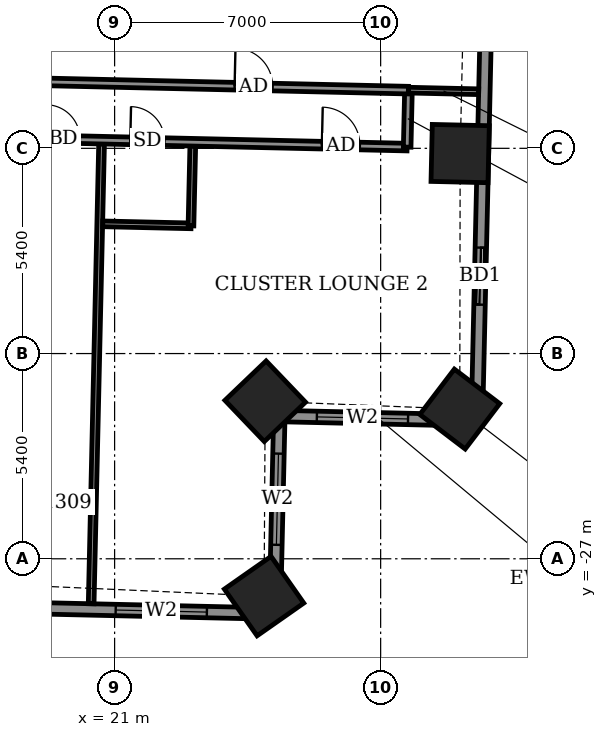
"""IFC4 building model, lengths in metres.
Left out: names, types, materials, properties, quantities, classifications, styles, units other than length and angle.
Written with IfcOpenShell. Run it as: python <this file> out.ifc"""

import sys

from ifc_helpers import new_model, si_unit, direction, frame, frame_2d, origin, origin_2d, place, context, subcontext, project, spatial, rectangle, extrude, element, fill, save


model = new_model("IFC4")
c1 = context("Model", 3, precision=1e-05, world=origin(), true_north=direction((0.0, 1.0)))
c2 = subcontext(c1, "Body", "Model", "MODEL_VIEW")
j1 = project(units=[si_unit("LENGTHUNIT", "METRE"), si_unit("PLANEANGLEUNIT", "RADIAN")], contexts=[c1])
p1 = place(None, origin())
s1 = spatial("IfcSite", under=j1, at=p1, CompositionType="ELEMENT")
p2 = place(p1, origin())
s2 = spatial("IfcBuilding", under=s1, at=p2, CompositionType="ELEMENT")
p3 = place(p2, frame((0.0, 0.0, 56.7)))
s3 = spatial("IfcBuildingStorey", under=s2, at=p3, CompositionType="ELEMENT", Elevation=56.7)
for number, where, z_axis, x_axis in (
    (1, (24.933, -27.982, -0.55), (0.0, 0.0, 1.0), (0.819, 0.574, 0.0)),
    (2, (24.963, -22.855, -0.55), (0.0, 0.0, 1.0), (0.723, 0.691, 0.0)),
    (3, (30.082, -23.061, -0.55), (0.0, 0.0, 1.0), (0.606, 0.796, 0.0)),
    (4, (30.092, -16.338, -0.55), (0.0, 0.0, 1.0), (0.023, 1.0, 0.0)),
):
    element("IfcColumn", number, at=place(p3, frame(where, z_axis=z_axis, x_axis=x_axis)), inside=s3, PredefinedType="COLUMN", context=c2, shape_type="SweptSolid", body=[
        extrude(rectangle(XDim=1.5, YDim=1.5, at=origin_2d()), origin(), (0.0, 0.0, 1.0), 3.6),
    ])
p4 = place(p3, frame((30.533, -23.362, 0.0), z_axis=(0.0, 0.0, 1.0), x_axis=(0.022698800888, 0.999742349027, 0.0)))
e5 = element("IfcWall", 5, at=p4, inside=s3, PredefinedType="SOLIDWALL", context=c2, shape_type="SweptSolid", body=[
    extrude(rectangle(XDim=14.23, YDim=0.3, at=frame_2d((7.115, 0.0))), origin(), (0.0, 0.0, 1.0), 3.05),
])
p5 = place(p4, frame((3.05, 0.0, 0.0)))
e6 = element("IfcOpeningElement", 6, at=p5, cuts=e5, PredefinedType="OPENING", context=c2, shape_type="SweptSolid", body=[
    extrude(rectangle(XDim=1.5, YDim=2.4, at=frame_2d((0.75, 1.2))), frame((0.0, 0.16, 0.0), z_axis=(0.0, -1.0, 0.0), x_axis=(1.0, 0.0, 0.0)), (0.0, 0.0, 1.0), 0.32),
])
p6 = place(p4, frame((9.937, 0.0, 0.9)))
e7 = element("IfcOpeningElement", 7, at=p6, cuts=e5, PredefinedType="OPENING", context=c2, shape_type="SweptSolid", body=[
    extrude(rectangle(XDim=2.4, YDim=1.5, at=frame_2d((1.2, 0.75))), frame((0.0, 0.16, 0.0), z_axis=(0.0, -1.0, 0.0), x_axis=(1.0, 0.0, 0.0)), (0.0, 0.0, 1.0), 0.32),
])
p7 = place(p3, frame((-24.007, -27.326, 0.0), z_axis=(0.0, 0.0, 1.0), x_axis=(0.999742536491, -0.022690542744, 0.0)))
e8 = element("IfcWall", 8, at=p7, inside=s3, PredefinedType="SOLIDWALL", context=c2, shape_type="SweptSolid", body=[
    extrude(rectangle(XDim=49.236, YDim=0.3, at=frame_2d((24.618, 0.0))), origin(), (0.0, 0.0, 1.0), 3.05),
])
p8 = place(p7, frame((2.115, 0.0, 0.0)))
e9 = element("IfcOpeningElement", 9, at=p8, cuts=e8, PredefinedType="OPENING", context=c2, shape_type="SweptSolid", body=[
    extrude(rectangle(XDim=1.5, YDim=2.4, at=frame_2d((0.75, 1.2))), frame((0.0, 0.16, 0.0), z_axis=(0.0, -1.0, 0.0), x_axis=(1.0, 0.0, 0.0)), (0.0, 0.0, 1.0), 0.32),
])
p9 = place(p7, frame((5.088, 0.0, 0.9)))
e10 = element("IfcOpeningElement", 10, at=p9, cuts=e8, PredefinedType="OPENING", context=c2, shape_type="SweptSolid", body=[
    extrude(rectangle(XDim=0.9, YDim=1.5, at=frame_2d((0.45, 0.75))), frame((0.0, 0.16, 0.0), z_axis=(0.0, -1.0, 0.0), x_axis=(1.0, 0.0, 0.0)), (0.0, 0.0, 1.0), 0.32),
])
p10 = place(p7, frame((10.475, 0.0, 0.0)))
e11 = element("IfcOpeningElement", 11, at=p10, cuts=e8, PredefinedType="OPENING", context=c2, shape_type="SweptSolid", body=[
    extrude(rectangle(XDim=1.5, YDim=2.4, at=frame_2d((0.75, 1.2))), frame((0.0, 0.16, 0.0), z_axis=(0.0, -1.0, 0.0), x_axis=(1.0, 0.0, 0.0)), (0.0, 0.0, 1.0), 0.32),
])
p11 = place(p7, frame((15.477, 0.0, 0.0)))
e12 = element("IfcOpeningElement", 12, at=p11, cuts=e8, PredefinedType="OPENING", context=c2, shape_type="SweptSolid", body=[
    extrude(rectangle(XDim=1.5, YDim=2.4, at=frame_2d((0.75, 1.2))), frame((0.0, 0.16, 0.0), z_axis=(0.0, -1.0, 0.0), x_axis=(1.0, 0.0, 0.0)), (0.0, 0.0, 1.0), 0.32),
])
p12 = place(p7, frame((18.515, 0.0, 0.0)))
e13 = element("IfcOpeningElement", 13, at=p12, cuts=e8, PredefinedType="OPENING", context=c2, shape_type="SweptSolid", body=[
    extrude(rectangle(XDim=1.5, YDim=2.4, at=frame_2d((0.75, 1.2))), frame((0.0, 0.16, 0.0), z_axis=(0.0, -1.0, 0.0), x_axis=(1.0, 0.0, 0.0)), (0.0, 0.0, 1.0), 0.32),
])
p13 = place(p7, frame((23.825, 0.0, 0.0)))
e14 = element("IfcOpeningElement", 14, at=p13, cuts=e8, PredefinedType="OPENING", context=c2, shape_type="SweptSolid", body=[
    extrude(rectangle(XDim=1.5, YDim=2.4, at=frame_2d((0.75, 1.2))), frame((0.0, 0.16, 0.0), z_axis=(0.0, -1.0, 0.0), x_axis=(1.0, 0.0, 0.0)), (0.0, 0.0, 1.0), 0.32),
])
p14 = place(p7, frame((29.128, 0.0, 0.0)))
e15 = element("IfcOpeningElement", 15, at=p14, cuts=e8, PredefinedType="OPENING", context=c2, shape_type="SweptSolid", body=[
    extrude(rectangle(XDim=1.5, YDim=2.4, at=frame_2d((0.75, 1.2))), frame((0.0, 0.16, 0.0), z_axis=(0.0, -1.0, 0.0), x_axis=(1.0, 0.0, 0.0)), (0.0, 0.0, 1.0), 0.32),
])
p15 = place(p7, frame((32.166, 0.0, 0.0)))
e16 = element("IfcOpeningElement", 16, at=p15, cuts=e8, PredefinedType="OPENING", context=c2, shape_type="SweptSolid", body=[
    extrude(rectangle(XDim=1.5, YDim=2.4, at=frame_2d((0.75, 1.2))), frame((0.0, 0.16, 0.0), z_axis=(0.0, -1.0, 0.0), x_axis=(1.0, 0.0, 0.0)), (0.0, 0.0, 1.0), 0.32),
])
p16 = place(p7, frame((37.091, 0.0, 0.0)))
e17 = element("IfcOpeningElement", 17, at=p16, cuts=e8, PredefinedType="OPENING", context=c2, shape_type="SweptSolid", body=[
    extrude(rectangle(XDim=1.5, YDim=2.4, at=frame_2d((0.75, 1.2))), frame((0.0, 0.16, 0.0), z_axis=(0.0, -1.0, 0.0), x_axis=(1.0, 0.0, 0.0)), (0.0, 0.0, 1.0), 0.32),
])
p17 = place(p7, frame((40.205, 0.0, 0.0)))
e18 = element("IfcOpeningElement", 18, at=p17, cuts=e8, PredefinedType="OPENING", context=c2, shape_type="SweptSolid", body=[
    extrude(rectangle(XDim=1.2, YDim=2.4, at=frame_2d((0.6, 1.2))), frame((0.0, 0.16, 0.0), z_axis=(0.0, -1.0, 0.0), x_axis=(1.0, 0.0, 0.0)), (0.0, 0.0, 1.0), 0.32),
])
p18 = place(p7, frame((45.047, 0.0, 0.9)))
e19 = element("IfcOpeningElement", 19, at=p18, cuts=e8, PredefinedType="OPENING", context=c2, shape_type="SweptSolid", body=[
    extrude(rectangle(XDim=2.4, YDim=1.5, at=frame_2d((1.2, 0.75))), frame((0.0, 0.16, 0.0), z_axis=(0.0, -1.0, 0.0), x_axis=(1.0, 0.0, 0.0)), (0.0, 0.0, 1.0), 0.32),
])
p19 = place(p3, frame((25.216, -28.443, 0.0), z_axis=(0.0, 0.0, 1.0), x_axis=(0.022674484462, 0.999742900827, 0.0)))
e20 = element("IfcWall", 20, at=p19, inside=s3, PredefinedType="SOLIDWALL", context=c2, shape_type="SweptSolid", body=[
    extrude(rectangle(XDim=5.2, YDim=0.3, at=frame_2d((2.6, 0.0))), origin(), (0.0, 0.0, 1.0), 2.55),
])
p20 = place(p19, frame((1.811, 0.0, 0.9)))
e21 = element("IfcOpeningElement", 21, at=p20, cuts=e20, PredefinedType="OPENING", context=c2, shape_type="SweptSolid", body=[
    extrude(rectangle(XDim=2.4, YDim=1.5, at=frame_2d((1.2, 0.75))), frame((0.0, 0.16, 0.0), z_axis=(0.0, -1.0, 0.0), x_axis=(1.0, 0.0, 0.0)), (0.0, 0.0, 1.0), 0.32),
])
p21 = place(p3, frame((25.334, -23.244, 0.0), z_axis=(0.0, 0.0, 1.0), x_axis=(0.999741811307, -0.022722471786, 0.0)))
e22 = element("IfcWall", 22, at=p21, inside=s3, PredefinedType="SOLIDWALL", context=c2, shape_type="SweptSolid", body=[
    extrude(rectangle(XDim=5.2, YDim=0.3, at=frame_2d((2.6, 0.0))), origin(), (0.0, 0.0, 1.0), 2.55),
])
p22 = place(p21, frame((0.988, 0.0, 0.9)))
e23 = element("IfcOpeningElement", 23, at=p22, cuts=e22, PredefinedType="OPENING", context=c2, shape_type="SweptSolid", body=[
    extrude(rectangle(XDim=2.4, YDim=1.5, at=frame_2d((1.2, 0.75))), frame((0.0, 0.16, 0.0), z_axis=(0.0, -1.0, 0.0), x_axis=(1.0, 0.0, 0.0)), (0.0, 0.0, 1.0), 0.32),
])
p23 = place(p3, frame((20.383, -28.183, 0.0), z_axis=(0.0, 0.0, 1.0), x_axis=(0.022637991173, 0.99974372784, 0.0)))
e24 = element("IfcWall", 24, at=p23, inside=s3, PredefinedType="PARTITIONING", context=c2, shape_type="SweptSolid", body=[
    extrude(rectangle(XDim=12.1, YDim=0.15, at=frame_2d((6.05, 0.0))), origin(), (0.0, 0.0, 1.0), 2.55),
])
p24 = place(p3, frame((20.687, -18.187, 0.0), z_axis=(0.0, 0.0, 1.0), x_axis=(0.999740260747, -0.02279059109, 0.0)))
e25 = element("IfcWall", 25, at=p24, inside=s3, PredefinedType="PARTITIONING", context=c2, shape_type="SweptSolid", body=[
    extrude(rectangle(XDim=2.324, YDim=0.15, at=frame_2d((1.162, 0.0))), origin(), (0.0, 0.0, 1.0), 3.05),
])
p25 = place(p3, frame((23.009, -18.24, 0.0), z_axis=(0.0, 0.0, 1.0), x_axis=(0.022792727877, 0.999740212033, 0.0)))
e26 = element("IfcWall", 26, at=p25, inside=s3, PredefinedType="PARTITIONING", context=c2, shape_type="SweptSolid", body=[
    extrude(rectangle(XDim=2.099, YDim=0.15, at=frame_2d((1.05, 0.0))), origin(), (0.0, 0.0, 1.0), 3.05),
])
p26 = place(p3, frame((-26.126, -14.924, 0.0), z_axis=(0.0, 0.0, 1.0), x_axis=(0.999742687583, -0.0226838847, 0.0)))
e27 = element("IfcWall", 27, at=p26, inside=s3, PredefinedType="PARTITIONING", context=c2, shape_type="SweptSolid", body=[
    extrude(rectangle(XDim=54.836, YDim=0.2, at=frame_2d((27.418, 0.0))), origin(), (0.0, 0.0, 1.0), 3.05),
])
p27 = place(p26, frame((0.775, 0.0, 0.0)))
e28 = element("IfcOpeningElement", 28, at=p27, cuts=e27, PredefinedType="OPENING", context=c2, shape_type="SweptSolid", body=[
    extrude(rectangle(XDim=1.0, YDim=2.1, at=frame_2d((0.5, 1.05))), frame((0.0, 0.11, 0.0), z_axis=(0.0, -1.0, 0.0), x_axis=(1.0, 0.0, 0.0)), (0.0, 0.0, 1.0), 0.22),
])
p28 = place(p26, frame((5.45, 0.0, 0.0)))
e29 = element("IfcOpeningElement", 29, at=p28, cuts=e27, PredefinedType="OPENING", context=c2, shape_type="SweptSolid", body=[
    extrude(rectangle(XDim=0.9, YDim=2.1, at=frame_2d((0.45, 1.05))), frame((0.0, 0.11, 0.0), z_axis=(0.0, -1.0, 0.0), x_axis=(1.0, 0.0, 0.0)), (0.0, 0.0, 1.0), 0.22),
])
p29 = place(p26, frame((10.0, 0.0, 0.0)))
e30 = element("IfcOpeningElement", 30, at=p29, cuts=e27, PredefinedType="OPENING", context=c2, shape_type="SweptSolid", body=[
    extrude(rectangle(XDim=0.9, YDim=2.1, at=frame_2d((0.45, 1.05))), frame((0.0, 0.11, 0.0), z_axis=(0.0, -1.0, 0.0), x_axis=(1.0, 0.0, 0.0)), (0.0, 0.0, 1.0), 0.22),
])
p30 = place(p26, frame((11.975, 0.0, 0.0)))
e31 = element("IfcOpeningElement", 31, at=p30, cuts=e27, PredefinedType="OPENING", context=c2, shape_type="SweptSolid", body=[
    extrude(rectangle(XDim=0.9, YDim=2.1, at=frame_2d((0.45, 1.05))), frame((0.0, 0.11, 0.0), z_axis=(0.0, -1.0, 0.0), x_axis=(1.0, 0.0, 0.0)), (0.0, 0.0, 1.0), 0.22),
])
p31 = place(p26, frame((18.85, 0.0, 0.0)))
e32 = element("IfcOpeningElement", 32, at=p31, cuts=e27, PredefinedType="OPENING", context=c2, shape_type="SweptSolid", body=[
    extrude(rectangle(XDim=0.9, YDim=2.1, at=frame_2d((0.45, 1.05))), frame((0.0, 0.11, 0.0), z_axis=(0.0, -1.0, 0.0), x_axis=(1.0, 0.0, 0.0)), (0.0, 0.0, 1.0), 0.22),
])
p32 = place(p26, frame((20.9, 0.0, 0.0)))
e33 = element("IfcOpeningElement", 33, at=p32, cuts=e27, PredefinedType="OPENING", context=c2, shape_type="SweptSolid", body=[
    extrude(rectangle(XDim=0.9, YDim=2.1, at=frame_2d((0.45, 1.05))), frame((0.0, 0.11, 0.0), z_axis=(0.0, -1.0, 0.0), x_axis=(1.0, 0.0, 0.0)), (0.0, 0.0, 1.0), 0.22),
])
p33 = place(p26, frame((27.725, 0.0, 0.0)))
e34 = element("IfcOpeningElement", 34, at=p33, cuts=e27, PredefinedType="OPENING", context=c2, shape_type="SweptSolid", body=[
    extrude(rectangle(XDim=0.9, YDim=2.1, at=frame_2d((0.45, 1.05))), frame((0.0, 0.11, 0.0), z_axis=(0.0, -1.0, 0.0), x_axis=(1.0, 0.0, 0.0)), (0.0, 0.0, 1.0), 0.22),
])
p34 = place(p26, frame((29.7, 0.0, 0.0)))
e35 = element("IfcOpeningElement", 35, at=p34, cuts=e27, PredefinedType="OPENING", context=c2, shape_type="SweptSolid", body=[
    extrude(rectangle(XDim=0.9, YDim=2.1, at=frame_2d((0.45, 1.05))), frame((0.0, 0.11, 0.0), z_axis=(0.0, -1.0, 0.0), x_axis=(1.0, 0.0, 0.0)), (0.0, 0.0, 1.0), 0.22),
])
p35 = place(p26, frame((36.5, 0.0, 0.0)))
e36 = element("IfcOpeningElement", 36, at=p35, cuts=e27, PredefinedType="OPENING", context=c2, shape_type="SweptSolid", body=[
    extrude(rectangle(XDim=0.9, YDim=2.1, at=frame_2d((0.45, 1.05))), frame((0.0, 0.11, 0.0), z_axis=(0.0, -1.0, 0.0), x_axis=(1.0, 0.0, 0.0)), (0.0, 0.0, 1.0), 0.22),
])
p36 = place(p26, frame((38.525, 0.0, 0.0)))
e37 = element("IfcOpeningElement", 37, at=p36, cuts=e27, PredefinedType="OPENING", context=c2, shape_type="SweptSolid", body=[
    extrude(rectangle(XDim=0.9, YDim=2.1, at=frame_2d((0.45, 1.05))), frame((0.0, 0.11, 0.0), z_axis=(0.0, -1.0, 0.0), x_axis=(1.0, 0.0, 0.0)), (0.0, 0.0, 1.0), 0.22),
])
p37 = place(p26, frame((45.325, 0.0, 0.0)))
e38 = element("IfcOpeningElement", 38, at=p37, cuts=e27, PredefinedType="OPENING", context=c2, shape_type="SweptSolid", body=[
    extrude(rectangle(XDim=0.9, YDim=2.1, at=frame_2d((0.45, 1.05))), frame((0.0, 0.11, 0.0), z_axis=(0.0, -1.0, 0.0), x_axis=(1.0, 0.0, 0.0)), (0.0, 0.0, 1.0), 0.22),
])
p38 = place(p26, frame((52.593, 0.0, 0.0)))
e39 = element("IfcOpeningElement", 39, at=p38, cuts=e27, PredefinedType="OPENING", context=c2, shape_type="SweptSolid", body=[
    extrude(rectangle(XDim=1.0, YDim=2.1, at=frame_2d((0.5, 1.05))), frame((0.0, 0.11, 0.0), z_axis=(0.0, -1.0, 0.0), x_axis=(1.0, 0.0, 0.0)), (0.0, 0.0, 1.0), 0.22),
])
p39 = place(p26, frame((47.55, 0.0, 0.0)))
e40 = element("IfcOpeningElement", 40, at=p39, cuts=e27, PredefinedType="OPENING", context=c2, shape_type="SweptSolid", body=[
    extrude(rectangle(XDim=0.9, YDim=2.1, at=frame_2d((0.45, 1.05))), frame((0.0, 0.11, 0.0), z_axis=(0.0, -1.0, 0.0), x_axis=(1.0, 0.0, 0.0)), (0.0, 0.0, 1.0), 0.22),
])
p40 = place(p3, frame((28.698, -16.169, 0.0), z_axis=(0.0, 0.0, 1.0), x_axis=(0.022617910375, 0.999744182344, 0.0)))
e41 = element("IfcWall", 41, at=p40, inside=s3, PredefinedType="PARTITIONING", context=c2, shape_type="SweptSolid", body=[
    extrude(rectangle(XDim=1.5, YDim=0.2, at=frame_2d((0.75, 0.0))), origin(), (0.0, 0.0, 1.0), 3.05),
])
p41 = place(p3, frame((18.382, -14.434, 0.0), z_axis=(0.0, 0.0, 1.0), x_axis=(0.999742529177, -0.022690865001, 0.0)))
e42 = element("IfcWall", 42, at=p41, inside=s3, PredefinedType="PARTITIONING", context=c2, shape_type="SweptSolid", body=[
    extrude(rectangle(XDim=10.351, YDim=0.2, at=frame_2d((5.175, 0.0))), origin(), (0.0, 0.0, 1.0), 3.05),
])
p42 = place(p41, frame((5.777, 0.0, 0.0)))
e43 = element("IfcOpeningElement", 43, at=p42, cuts=e42, PredefinedType="OPENING", context=c2, shape_type="SweptSolid", body=[
    extrude(rectangle(XDim=1.0, YDim=2.1, at=frame_2d((0.5, 1.05))), frame((0.0, 0.11, 0.0), z_axis=(0.0, -1.0, 0.0), x_axis=(1.0, 0.0, 0.0)), (0.0, 0.0, 1.0), 0.22),
])
p43 = place(p3, frame((28.73, -14.669, 0.0), z_axis=(0.0, 0.0, 1.0), x_axis=(0.999742244252, -0.022703415106, 0.0)))
e44 = element("IfcWall", 44, at=p43, inside=s3, PredefinedType="PARTITIONING", context=c2, shape_type="SweptSolid", body=[
    extrude(rectangle(XDim=1.85, YDim=0.15, at=frame_2d((0.925, 0.0))), origin(), (0.0, 0.0, 1.0), 2.55),
])
p44 = place(p5, origin())
e45 = element("IfcDoor", 45, at=p44, inside=s3, OperationType="SLIDING_TO_LEFT", PredefinedType="DOOR", context=c2, shape_type="SweptSolid", body=[
    extrude(rectangle(XDim=1.5, YDim=2.4, at=frame_2d((0.75, 1.2))), frame((0.0, 0.025, 0.0), z_axis=(0.0, -1.0, 0.0), x_axis=(1.0, 0.0, 0.0)), (0.0, 0.0, 1.0), 0.05),
])
fill(e6, e45)
p45 = place(p18, origin())
e46 = element("IfcWindow", 46, at=p45, inside=s3, PartitioningType="DOUBLE_PANEL_VERTICAL", PredefinedType="WINDOW", context=c2, shape_type="SweptSolid", body=[
    extrude(rectangle(XDim=2.4, YDim=1.5, at=frame_2d((1.2, 0.75))), frame((0.0, 0.03, 0.0), z_axis=(0.0, -1.0, 0.0), x_axis=(1.0, 0.0, 0.0)), (0.0, 0.0, 1.0), 0.06),
])
fill(e19, e46)
p46 = place(p20, origin())
e47 = element("IfcWindow", 47, at=p46, inside=s3, PartitioningType="DOUBLE_PANEL_VERTICAL", PredefinedType="WINDOW", context=c2, shape_type="SweptSolid", body=[
    extrude(rectangle(XDim=2.4, YDim=1.5, at=frame_2d((1.2, 0.75))), frame((0.0, 0.03, 0.0), z_axis=(0.0, -1.0, 0.0), x_axis=(1.0, 0.0, 0.0)), (0.0, 0.0, 1.0), 0.06),
])
fill(e21, e47)
p47 = place(p22, origin())
e48 = element("IfcWindow", 48, at=p47, inside=s3, PartitioningType="DOUBLE_PANEL_VERTICAL", PredefinedType="WINDOW", context=c2, shape_type="SweptSolid", body=[
    extrude(rectangle(XDim=2.4, YDim=1.5, at=frame_2d((1.2, 0.75))), frame((0.0, 0.03, 0.0), z_axis=(0.0, -1.0, 0.0), x_axis=(1.0, 0.0, 0.0)), (0.0, 0.0, 1.0), 0.06),
])
fill(e23, e48)
p48 = place(p37, origin())
e49 = element("IfcDoor", 49, at=p48, inside=s3, OperationType="SINGLE_SWING_LEFT", PredefinedType="DOOR", context=c2, shape_type="SweptSolid", body=[
    extrude(rectangle(XDim=0.9, YDim=2.1, at=frame_2d((0.45, 1.05))), frame((0.0, 0.025, 0.0), z_axis=(0.0, -1.0, 0.0), x_axis=(1.0, 0.0, 0.0)), (0.0, 0.0, 1.0), 0.05),
])
fill(e38, e49)
p49 = place(p38, origin())
e50 = element("IfcDoor", 50, at=p49, inside=s3, OperationType="SINGLE_SWING_RIGHT", PredefinedType="DOOR", context=c2, shape_type="SweptSolid", body=[
    extrude(rectangle(XDim=1.0, YDim=2.1, at=frame_2d((0.5, 1.05))), frame((0.0, 0.025, 0.0), z_axis=(0.0, -1.0, 0.0), x_axis=(1.0, 0.0, 0.0)), (0.0, 0.0, 1.0), 0.05),
])
fill(e39, e50)
p50 = place(p39, origin())
e51 = element("IfcDoor", 51, at=p50, inside=s3, OperationType="SINGLE_SWING_RIGHT", PredefinedType="DOOR", context=c2, shape_type="SweptSolid", body=[
    extrude(rectangle(XDim=0.9, YDim=2.1, at=frame_2d((0.45, 1.05))), frame((0.0, 0.025, 0.0), z_axis=(0.0, -1.0, 0.0), x_axis=(1.0, 0.0, 0.0)), (0.0, 0.0, 1.0), 0.05),
])
fill(e40, e51)
p51 = place(p42, origin())
e52 = element("IfcDoor", 52, at=p51, inside=s3, OperationType="SINGLE_SWING_LEFT", PredefinedType="DOOR", context=c2, shape_type="SweptSolid", body=[
    extrude(rectangle(XDim=1.0, YDim=2.1, at=frame_2d((0.5, 1.05))), frame((0.0, 0.025, 0.0), z_axis=(0.0, -1.0, 0.0), x_axis=(1.0, 0.0, 0.0)), (0.0, 0.0, 1.0), 0.05),
])
fill(e43, e52)
save(model, sys.argv[1])
